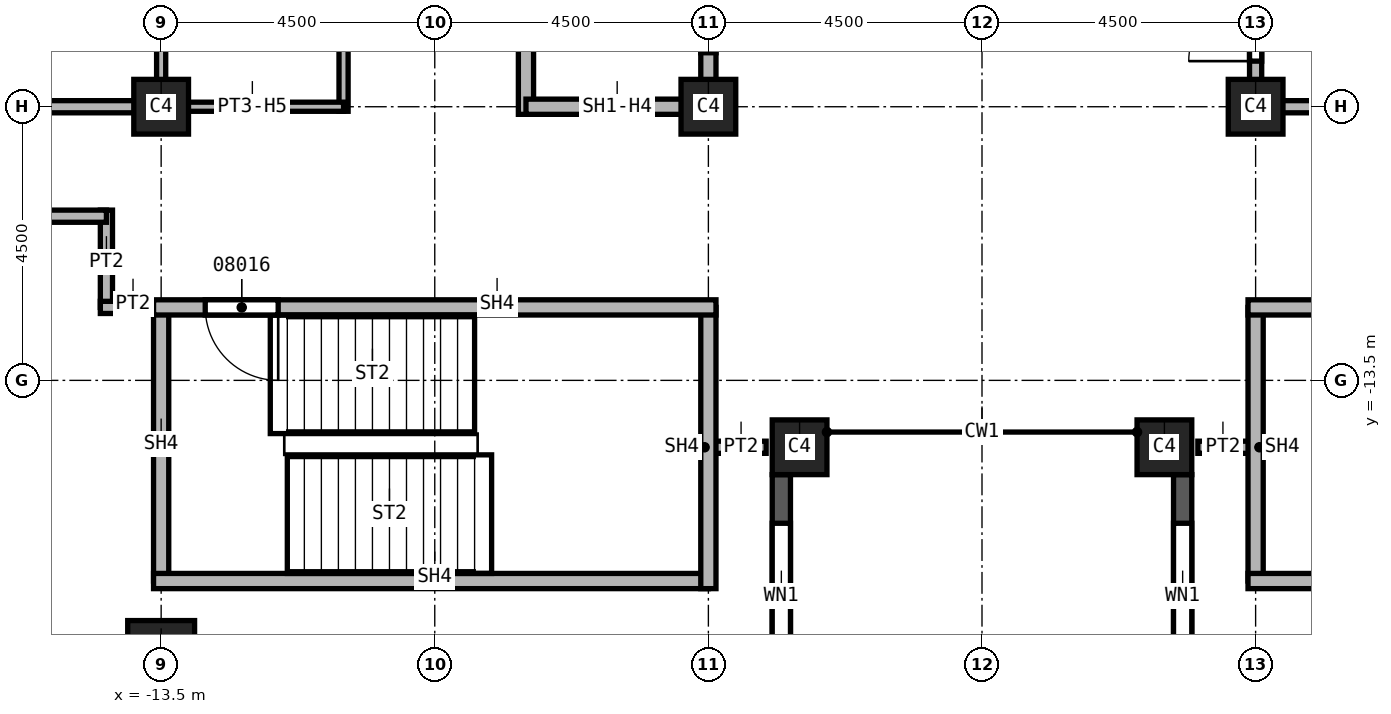
"""IFC4 building model, lengths in metres.
Left out: names, types, materials, properties, quantities, classifications, styles, units other than length and angle.
Written with IfcOpenShell. Run it as: python <this file> out.ifc"""

import sys

from ifc_helpers import new_model, si_unit, direction, frame, frame_2d, origin, origin_2d, place, context, subcontext, project, spatial, rectangle, extrude, element, fill, save


model = new_model("IFC4")
c1 = context("Model", 3, precision=1e-05, world=origin(), true_north=direction((0.0, 1.0)))
c2 = subcontext(c1, "Body", "Model", "MODEL_VIEW")
j1 = project(units=[si_unit("LENGTHUNIT", "METRE"), si_unit("PLANEANGLEUNIT", "RADIAN")], contexts=[c1])
p1 = place(None, origin())
s1 = spatial("IfcSite", under=j1, at=p1, CompositionType="ELEMENT")
p2 = place(p1, origin())
s2 = spatial("IfcBuilding", under=s1, at=p2, CompositionType="ELEMENT")
p3 = place(p2, frame((0.0, 0.0, 150.0)))
s3 = spatial("IfcBuildingStorey", under=s2, at=p3, CompositionType="ELEMENT", Elevation=150.0)
p4 = place(p3, frame((-13.5, -18.0, 0.0), z_axis=(0.0, 0.0, 1.0), x_axis=(1.0, 0.0, 0.0)))
e1 = element("IfcColumn", 1, at=p4, inside=s3, PredefinedType="COLUMN", context=c2, shape_type="SweptSolid", body=[
    extrude(rectangle(XDim=1.1, YDim=1.1, at=origin_2d()), origin(), (0.0, 0.0, 1.0), 3.7),
])
for number, where, z_axis, x_axis in (
    (2, (4.5, -9.0, 0.0), (0.0, 0.0, 1.0), (1.0, 0.0, 0.0)),
    (3, (-4.5, -9.0, 0.0), (0.0, 0.0, 1.0), (1.0, 0.0, 0.0)),
    (4, (-13.5, -9.0, 0.0), (0.0, 0.0, 1.0), (1.0, 0.0, 0.0)),
    (5, (3.0, -14.6, 0.0), (0.0, 0.0, 1.0), (1.0, 0.0, 0.0)),
    (6, (-3.0, -14.6, 0.0), (0.0, 0.0, 1.0), (1.0, 0.0, 0.0)),
):
    element("IfcColumn", number, at=place(p3, frame(where, z_axis=z_axis, x_axis=x_axis)), inside=s3, PredefinedType="COLUMN", context=c2, shape_type="SweptSolid", body=[
        extrude(rectangle(XDim=0.9, YDim=0.9, at=origin_2d()), origin(), (0.0, 0.0, 1.0), 3.7),
    ])
p5 = place(p3, frame((-3.3, -23.05, 0.0), z_axis=(0.0, 0.0, 1.0), x_axis=(0.0, 1.0, 0.0)))
e7 = element("IfcWall", 7, at=p5, inside=s3, PredefinedType="SOLIDWALL", context=c2, shape_type="SweptSolid", body=[
    extrude(rectangle(XDim=8.0, YDim=0.3, at=frame_2d((4.0, 0.0))), origin(), (0.0, 0.0, 1.0), 3.1),
])
p6 = place(p5, frame((0.8, 0.0, 0.8)))
e8 = element("IfcOpeningElement", 8, at=p6, cuts=e7, PredefinedType="OPENING", context=c2, shape_type="SweptSolid", body=[
    extrude(rectangle(XDim=2.4, YDim=1.95, at=frame_2d((1.2, 0.975))), frame((0.0, 0.15, 0.0), z_axis=(0.0, -1.0, 0.0), x_axis=(1.0, 0.0, 0.0)), (0.0, 0.0, 1.0), 0.3),
])
p7 = place(p5, frame((4.8, 0.0, 0.8)))
e9 = element("IfcOpeningElement", 9, at=p7, cuts=e7, PredefinedType="OPENING", context=c2, shape_type="SweptSolid", body=[
    extrude(rectangle(XDim=2.4, YDim=1.95, at=frame_2d((1.2, 0.975))), frame((0.0, 0.15, 0.0), z_axis=(0.0, -1.0, 0.0), x_axis=(1.0, 0.0, 0.0)), (0.0, 0.0, 1.0), 0.3),
])
p8 = place(p3, frame((3.3, -15.05, 0.0), z_axis=(0.0, 0.0, 1.0), x_axis=(0.0, -1.0, 0.0)))
e10 = element("IfcWall", 10, at=p8, inside=s3, PredefinedType="SOLIDWALL", context=c2, shape_type="SweptSolid", body=[
    extrude(rectangle(XDim=8.0, YDim=0.3, at=frame_2d((4.0, 0.0))), origin(), (0.0, 0.0, 1.0), 3.1),
])
p9 = place(p8, frame((0.8, 0.0, 0.8)))
e11 = element("IfcOpeningElement", 11, at=p9, cuts=e10, PredefinedType="OPENING", context=c2, shape_type="SweptSolid", body=[
    extrude(rectangle(XDim=2.4, YDim=1.95, at=frame_2d((1.2, 0.975))), frame((0.0, 0.15, 0.0), z_axis=(0.0, -1.0, 0.0), x_axis=(1.0, 0.0, 0.0)), (0.0, 0.0, 1.0), 0.3),
])
p10 = place(p8, frame((4.8, 0.0, 0.8)))
e12 = element("IfcOpeningElement", 12, at=p10, cuts=e10, PredefinedType="OPENING", context=c2, shape_type="SweptSolid", body=[
    extrude(rectangle(XDim=2.4, YDim=1.95, at=frame_2d((1.2, 0.975))), frame((0.0, 0.15, 0.0), z_axis=(0.0, -1.0, 0.0), x_axis=(1.0, 0.0, 0.0)), (0.0, 0.0, 1.0), 0.3),
])
p11 = place(p3, frame((-18.0, -9.0, 0.0), z_axis=(0.0, 0.0, 1.0), x_axis=(1.0, 0.0, 0.0)))
e13 = element("IfcWall", 13, at=p11, inside=s3, PredefinedType="PARTITIONING", context=c2, shape_type="SweptSolid", body=[
    extrude(rectangle(XDim=4.5, YDim=0.2, at=frame_2d((2.25, 0.0))), origin(), (0.0, 0.0, 1.0), 3.7),
])
p12 = place(p3, frame((-14.4, -12.3, 0.0), z_axis=(0.0, 0.0, 1.0), x_axis=(0.0, 1.0, 0.0)))
e14 = element("IfcWall", 14, at=p12, inside=s3, PredefinedType="PARTITIONING", context=c2, shape_type="SweptSolid", body=[
    extrude(rectangle(XDim=1.6, YDim=0.2, at=frame_2d((0.8, 0.0))), origin(), (0.0, 0.0, 1.0), 3.7),
])
p13 = place(p3, frame((-14.4, -10.8, 0.0), z_axis=(0.0, 0.0, 1.0), x_axis=(-1.0, 0.0, 0.0)))
e15 = element("IfcWall", 15, at=p13, inside=s3, PredefinedType="PARTITIONING", context=c2, shape_type="SweptSolid", body=[
    extrude(rectangle(XDim=3.6, YDim=0.2, at=frame_2d((1.8, 0.0))), origin(), (0.0, 0.0, 1.0), 3.7),
])
p14 = place(p3, frame((-13.375, -12.3, 0.0), z_axis=(0.0, 0.0, 1.0), x_axis=(-1.0, 0.0, 0.0)))
e16 = element("IfcWall", 16, at=p14, inside=s3, PredefinedType="PARTITIONING", context=c2, shape_type="SweptSolid", body=[
    extrude(rectangle(XDim=1.125, YDim=0.2, at=frame_2d((0.562, 0.0))), origin(), (0.0, 0.0, 1.0), 3.7),
])
for number, where, z_axis, x_axis in (
    (17, (-3.55, -14.6, 0.0), (0.0, 0.0, 1.0), (-1.0, 0.0, 0.0)),
    (18, (4.5, -14.6, 0.0), (0.0, 0.0, 1.0), (-1.0, 0.0, 0.0)),
):
    element("IfcWall", number, at=place(p3, frame(where, z_axis=z_axis, x_axis=x_axis)), inside=s3, PredefinedType="PARTITIONING", context=c2, shape_type="SweptSolid", body=[
        extrude(rectangle(XDim=0.95, YDim=0.2, at=frame_2d((0.475, 0.0))), origin(), (0.0, 0.0, 1.0), 3.7),
    ])
p15 = place(p3, frame((4.5, -9.1, 0.0), z_axis=(0.0, 0.0, 1.0), x_axis=(0.0, 1.0, 0.0)))
e19 = element("IfcWall", 19, at=p15, inside=s3, PredefinedType="SOLIDWALL", context=c2, shape_type="SweptSolid", body=[
    extrude(rectangle(XDim=9.1, YDim=0.2, at=frame_2d((4.55, 0.0))), origin(), (0.0, 0.0, 1.0), 2.938),
])
p16 = place(p15, frame((0.85, 0.0, 0.0)))
e20 = element("IfcOpeningElement", 20, at=p16, cuts=e19, PredefinedType="OPENING", context=c2, shape_type="SweptSolid", body=[
    extrude(rectangle(XDim=1.1, YDim=2.1, at=frame_2d((0.55, 1.05))), frame((0.0, 0.1, 0.0), z_axis=(0.0, -1.0, 0.0), x_axis=(1.0, 0.0, 0.0)), (0.0, 0.0, 1.0), 0.2),
])
p17 = place(p15, frame((3.35, 0.0, 0.0)))
e21 = element("IfcOpeningElement", 21, at=p17, cuts=e19, PredefinedType="OPENING", context=c2, shape_type="SweptSolid", body=[
    extrude(rectangle(XDim=1.1, YDim=2.1, at=frame_2d((0.55, 1.05))), frame((0.0, 0.1, 0.0), z_axis=(0.0, -1.0, 0.0), x_axis=(1.0, 0.0, 0.0)), (0.0, 0.0, 1.0), 0.2),
])
p18 = place(p3, frame((7.5, -9.0, 0.0), z_axis=(0.0, 0.0, 1.0), x_axis=(-1.0, 0.0, 0.0)))
e22 = element("IfcWall", 22, at=p18, inside=s3, PredefinedType="SOLIDWALL", context=c2, shape_type="SweptSolid", body=[
    extrude(rectangle(XDim=3.0, YDim=0.2, at=frame_2d((1.5, 0.0))), origin(), (0.0, 0.0, 1.0), 2.938),
])
p19 = place(p3, frame((-7.5, -9.125, 0.0), z_axis=(0.0, 0.0, 1.0), x_axis=(0.0, 1.0, 0.0)))
e23 = element("IfcWall", 23, at=p19, inside=s3, PredefinedType="SOLIDWALL", context=c2, shape_type="SweptSolid", body=[
    extrude(rectangle(XDim=12.25, YDim=0.25, at=frame_2d((6.125, 0.0))), origin(), (0.0, 0.0, 1.0), 3.7),
])
p20 = place(p3, frame((-4.5, -9.0, 0.0), z_axis=(0.0, 0.0, 1.0), x_axis=(-1.0, 0.0, 0.0)))
e24 = element("IfcWall", 24, at=p20, inside=s3, PredefinedType="SOLIDWALL", context=c2, shape_type="SweptSolid", body=[
    extrude(rectangle(XDim=3.0, YDim=0.25, at=frame_2d((1.5, 0.0))), origin(), (0.0, 0.0, 1.0), 2.938),
])
p21 = place(p3, frame((-4.5, 0.0, 0.0), z_axis=(0.0, 0.0, 1.0), x_axis=(0.0, -1.0, 0.0)))
e25 = element("IfcWall", 25, at=p21, inside=s3, PredefinedType="SOLIDWALL", context=c2, shape_type="SweptSolid", body=[
    extrude(rectangle(XDim=9.125, YDim=0.25, at=frame_2d((4.562, 0.0))), origin(), (0.0, 0.0, 1.0), 2.938),
])
p22 = place(p21, frame((7.012, 0.0, 0.0)))
e26 = element("IfcOpeningElement", 26, at=p22, cuts=e25, PredefinedType="OPENING", context=c2, shape_type="SweptSolid", body=[
    extrude(rectangle(XDim=1.1, YDim=2.1, at=frame_2d((0.55, 1.05))), frame((0.0, 0.125, 0.0), z_axis=(0.0, -1.0, 0.0), x_axis=(1.0, 0.0, 0.0)), (0.0, 0.0, 1.0), 0.25),
])
p23 = place(p21, frame((3.95, 0.0, 0.0)))
e27 = element("IfcOpeningElement", 27, at=p23, cuts=e25, PredefinedType="OPENING", context=c2, shape_type="SweptSolid", body=[
    extrude(rectangle(XDim=1.1, YDim=2.1, at=frame_2d((0.55, 1.05))), frame((0.0, 0.125, 0.0), z_axis=(0.0, -1.0, 0.0), x_axis=(1.0, 0.0, 0.0)), (0.0, 0.0, 1.0), 0.25),
])
p24 = place(p21, frame((0.95, 0.0, 0.0)))
e28 = element("IfcOpeningElement", 28, at=p24, cuts=e25, PredefinedType="OPENING", context=c2, shape_type="SweptSolid", body=[
    extrude(rectangle(XDim=1.1, YDim=2.1, at=frame_2d((0.55, 1.05))), frame((0.0, 0.125, 0.0), z_axis=(0.0, -1.0, 0.0), x_axis=(1.0, 0.0, 0.0)), (0.0, 0.0, 1.0), 0.25),
])
p25 = place(p3, frame((-13.5, -16.8, 0.0), z_axis=(0.0, 0.0, 1.0), x_axis=(0.0, 1.0, 0.0)))
e29 = element("IfcWall", 29, at=p25, inside=s3, PredefinedType="SOLIDWALL", context=c2, shape_type="SweptSolid", body=[
    extrude(rectangle(XDim=4.5, YDim=0.25, at=frame_2d((2.25, 0.0))), origin(), (0.0, 0.0, 1.0), 3.7),
])
p26 = place(p3, frame((-4.5, -16.8, 0.0), z_axis=(0.0, 0.0, 1.0), x_axis=(-1.0, 0.0, 0.0)))
e30 = element("IfcWall", 30, at=p26, inside=s3, PredefinedType="SOLIDWALL", context=c2, shape_type="SweptSolid", body=[
    extrude(rectangle(XDim=9.125, YDim=0.25, at=frame_2d((4.562, 0.0))), origin(), (0.0, 0.0, 1.0), 3.7),
])
p27 = place(p3, frame((-4.5, -12.3, 0.0), z_axis=(0.0, 0.0, 1.0), x_axis=(0.0, -1.0, 0.0)))
e31 = element("IfcWall", 31, at=p27, inside=s3, PredefinedType="SOLIDWALL", context=c2, shape_type="SweptSolid", body=[
    extrude(rectangle(XDim=4.625, YDim=0.25, at=frame_2d((2.312, 0.0))), origin(), (0.0, 0.0, 1.0), 3.7),
])
p28 = place(p3, frame((-4.375, -12.3, 0.0), z_axis=(0.0, 0.0, 1.0), x_axis=(-1.0, 0.0, 0.0)))
e32 = element("IfcWall", 32, at=p28, inside=s3, PredefinedType="SOLIDWALL", context=c2, shape_type="SweptSolid", body=[
    extrude(rectangle(XDim=9.25, YDim=0.25, at=frame_2d((4.625, 0.0))), origin(), (0.0, 0.0, 1.0), 3.7),
])
p29 = place(p28, frame((7.2, 0.0, 0.0)))
e33 = element("IfcOpeningElement", 33, at=p29, cuts=e32, PredefinedType="OPENING", context=c2, shape_type="SweptSolid", body=[
    extrude(rectangle(XDim=1.2, YDim=2.1, at=frame_2d((0.6, 1.05))), frame((0.0, 0.125, 0.0), z_axis=(0.0, -1.0, 0.0), x_axis=(1.0, 0.0, 0.0)), (0.0, 0.0, 1.0), 0.25),
])
p30 = place(p3, frame((4.5, -16.8, 0.0), z_axis=(0.0, 0.0, 1.0), x_axis=(0.0, 1.0, 0.0)))
e34 = element("IfcWall", 34, at=p30, inside=s3, PredefinedType="SOLIDWALL", context=c2, shape_type="SweptSolid", body=[
    extrude(rectangle(XDim=4.5, YDim=0.25, at=frame_2d((2.25, 0.0))), origin(), (0.0, 0.0, 1.0), 3.7),
])
p31 = place(p3, frame((13.5, -16.8, 0.0), z_axis=(0.0, 0.0, 1.0), x_axis=(-1.0, 0.0, 0.0)))
e35 = element("IfcWall", 35, at=p31, inside=s3, PredefinedType="SOLIDWALL", context=c2, shape_type="SweptSolid", body=[
    extrude(rectangle(XDim=9.125, YDim=0.25, at=frame_2d((4.562, 0.0))), origin(), (0.0, 0.0, 1.0), 3.7),
])
p32 = place(p3, frame((13.625, -12.3, 0.0), z_axis=(0.0, 0.0, 1.0), x_axis=(-1.0, 0.0, 0.0)))
e36 = element("IfcWall", 36, at=p32, inside=s3, PredefinedType="SOLIDWALL", context=c2, shape_type="SweptSolid", body=[
    extrude(rectangle(XDim=9.25, YDim=0.25, at=frame_2d((4.625, 0.0))), origin(), (0.0, 0.0, 1.0), 3.7),
])
p33 = place(p32, frame((0.85, 0.0, 0.0)))
e37 = element("IfcOpeningElement", 37, at=p33, cuts=e36, PredefinedType="OPENING", context=c2, shape_type="SweptSolid", body=[
    extrude(rectangle(XDim=1.2, YDim=2.1, at=frame_2d((0.6, 1.05))), frame((0.0, 0.125, 0.0), z_axis=(0.0, -1.0, 0.0), x_axis=(1.0, 0.0, 0.0)), (0.0, 0.0, 1.0), 0.25),
])
p34 = place(p3, frame((-13.5, -9.1, 0.0), z_axis=(0.0, 0.0, 1.0), x_axis=(0.0, 1.0, 0.0)))
e38 = element("IfcWall", 38, at=p34, inside=s3, PredefinedType="PARTITIONING", context=c2, shape_type="SweptSolid", body=[
    extrude(rectangle(XDim=6.1, YDim=0.15, at=frame_2d((3.05, 0.0))), origin(), (0.0, 0.0, 1.0), 2.938),
])
p35 = place(p3, frame((-10.5, -9.075, 0.0), z_axis=(0.0, 0.0, 1.0), x_axis=(0.0, 1.0, 0.0)))
e39 = element("IfcWall", 39, at=p35, inside=s3, PredefinedType="PARTITIONING", context=c2, shape_type="SweptSolid", body=[
    extrude(rectangle(XDim=6.2, YDim=0.15, at=frame_2d((3.1, 0.0))), origin(), (0.0, 0.0, 1.0), 3.7),
])
p36 = place(p35, frame((3.55, 0.0, 0.0)))
e40 = element("IfcOpeningElement", 40, at=p36, cuts=e39, PredefinedType="OPENING", context=c2, shape_type="SweptSolid", body=[
    extrude(rectangle(XDim=0.9, YDim=2.1, at=frame_2d((0.45, 1.05))), frame((0.0, 0.075, 0.0), z_axis=(0.0, -1.0, 0.0), x_axis=(1.0, 0.0, 0.0)), (0.0, 0.0, 1.0), 0.15),
])
p37 = place(p3, frame((-10.5, -9.0, 0.0), z_axis=(0.0, 0.0, 1.0), x_axis=(-1.0, 0.0, 0.0)))
e41 = element("IfcWall", 41, at=p37, inside=s3, PredefinedType="PARTITIONING", context=c2, shape_type="SweptSolid", body=[
    extrude(rectangle(XDim=3.075, YDim=0.15, at=frame_2d((1.538, 0.0))), origin(), (0.0, 0.0, 1.0), 2.938),
])
p38 = place(p7, origin())
e42 = element("IfcWindow", 42, at=p38, inside=s3, PartitioningType="SINGLE_PANEL", PredefinedType="WINDOW", context=c2, shape_type="SweptSolid", body=[
    extrude(rectangle(XDim=2.4, YDim=1.95, at=frame_2d((1.2, 0.975))), frame((0.0, 0.03, 0.0), z_axis=(0.0, -1.0, 0.0), x_axis=(1.0, 0.0, 0.0)), (0.0, 0.0, 1.0), 0.06),
])
fill(e9, e42)
p39 = place(p9, origin())
e43 = element("IfcWindow", 43, at=p39, inside=s3, PartitioningType="SINGLE_PANEL", PredefinedType="WINDOW", context=c2, shape_type="SweptSolid", body=[
    extrude(rectangle(XDim=2.4, YDim=1.95, at=frame_2d((1.2, 0.975))), frame((0.0, 0.03, 0.0), z_axis=(0.0, -1.0, 0.0), x_axis=(1.0, 0.0, 0.0)), (0.0, 0.0, 1.0), 0.06),
])
fill(e11, e43)
p40 = place(p16, origin())
e44 = element("IfcDoor", 44, at=p40, inside=s3, OperationType="SINGLE_SWING_LEFT", PredefinedType="DOOR", context=c2, shape_type="SweptSolid", body=[
    extrude(rectangle(XDim=1.1, YDim=2.1, at=frame_2d((0.55, 1.05))), frame((0.0, 0.025, 0.0), z_axis=(0.0, -1.0, 0.0), x_axis=(1.0, 0.0, 0.0)), (0.0, 0.0, 1.0), 0.05),
])
fill(e20, e44)
p41 = place(p29, origin())
e45 = element("IfcDoor", 45, at=p41, inside=s3, OperationType="SINGLE_SWING_LEFT", PredefinedType="DOOR", context=c2, shape_type="SweptSolid", body=[
    extrude(rectangle(XDim=1.2, YDim=2.1, at=frame_2d((0.6, 1.05))), frame((0.0, 0.025, 0.0), z_axis=(0.0, -1.0, 0.0), x_axis=(1.0, 0.0, 0.0)), (0.0, 0.0, 1.0), 0.05),
])
fill(e33, e45)
p42 = place(p22, origin())
e46 = element("IfcDoor", 46, at=p42, inside=s3, OperationType="SLIDING_TO_LEFT", PredefinedType="DOOR", context=c2, shape_type="SweptSolid", body=[
    extrude(rectangle(XDim=1.1, YDim=2.1, at=frame_2d((0.55, 1.05))), frame((0.0, 0.025, 0.0), z_axis=(0.0, -1.0, 0.0), x_axis=(1.0, 0.0, 0.0)), (0.0, 0.0, 1.0), 0.05),
])
fill(e26, e46)
save(model, sys.argv[1])
